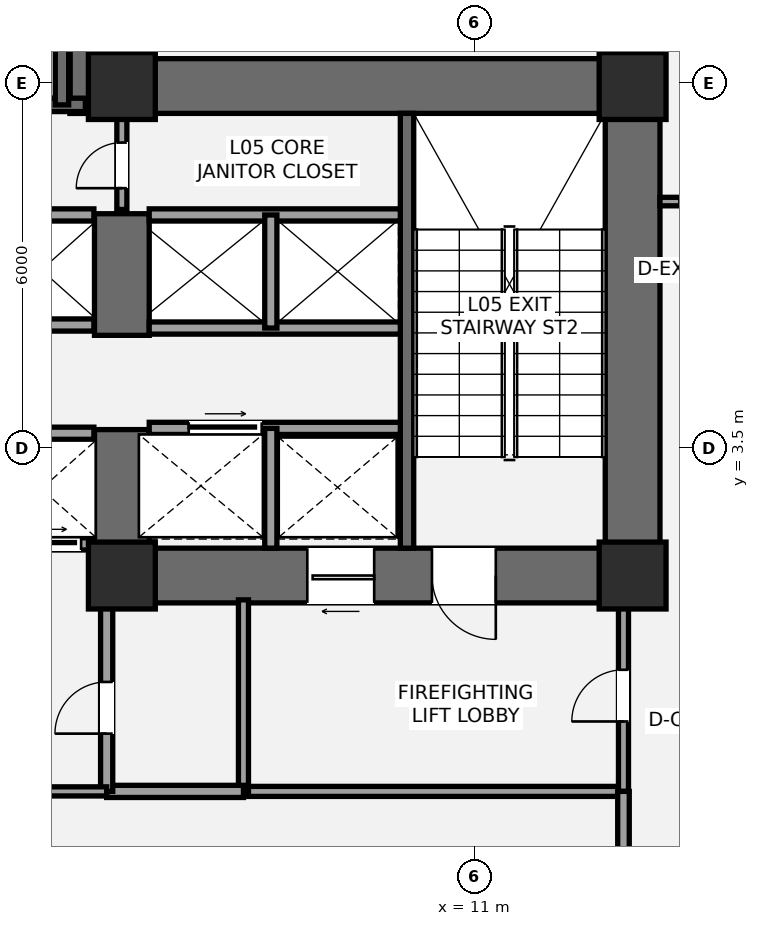
"""IFC4 building model, lengths in metres.
Left out: names, types, materials, properties, quantities, classifications, styles, units other than length and angle.
Written with IfcOpenShell. Run it as: python <this file> out.ifc"""

import sys

from ifc_helpers import new_model, si_unit, direction, frame, frame_2d, origin, origin_2d, place, context, subcontext, project, spatial, rectangle, extrude, element, fill, save


model = new_model("IFC4")
c1 = context("Model", 3, precision=1e-05, world=origin(), true_north=direction((0.0, 1.0)))
c2 = subcontext(c1, "Body", "Model", "MODEL_VIEW")
j1 = project(units=[si_unit("LENGTHUNIT", "METRE"), si_unit("PLANEANGLEUNIT", "RADIAN")], contexts=[c1])
p1 = place(None, origin())
s1 = spatial("IfcSite", under=j1, at=p1, CompositionType="ELEMENT")
p2 = place(p1, origin())
s2 = spatial("IfcBuilding", under=s1, at=p2, CompositionType="ELEMENT")
p3 = place(p2, frame((0.0, 0.0, 22.8)))
s3 = spatial("IfcBuildingStorey", under=s2, at=p3, CompositionType="ELEMENT", Elevation=22.8)
p4 = place(p3, frame((13.6, 0.95, 0.0), z_axis=(0.0, 0.0, 1.0), x_axis=(0.0, 1.0, 0.0)))
e1 = element("IfcWall", 1, at=p4, inside=s3, PredefinedType="SHEAR", context=c2, shape_type="SweptSolid", body=[
    extrude(rectangle(XDim=8.95, YDim=0.9, at=frame_2d((4.475, 0.0))), origin(), (0.0, 0.0, 1.0), 4.2),
])
p5 = place(p3, frame((4.35, 9.45, 0.0), z_axis=(0.0, 0.0, 1.0), x_axis=(1.0, 0.0, 0.0)))
e2 = element("IfcWall", 2, at=p5, inside=s3, PredefinedType="SHEAR", context=c2, shape_type="SweptSolid", body=[
    extrude(rectangle(XDim=9.7, YDim=0.9, at=frame_2d((4.85, 0.0))), origin(), (0.0, 0.0, 1.0), 4.2),
])
p6 = place(p3, frame((14.05, 1.4, 0.0), z_axis=(0.0, 0.0, 1.0), x_axis=(-1.0, 0.0, 0.0)))
e3 = element("IfcWall", 3, at=p6, inside=s3, PredefinedType="SHEAR", context=c2, shape_type="SweptSolid", body=[
    extrude(rectangle(XDim=9.3, YDim=0.9, at=frame_2d((4.65, 0.0))), origin(), (0.0, 0.0, 1.0), 4.2),
])
p7 = place(p6, frame((2.7, 0.0, 0.0)))
e4 = element("IfcOpeningElement", 4, at=p7, cuts=e3, PredefinedType="OPENING", context=c2, shape_type="SweptSolid", body=[
    extrude(rectangle(XDim=1.05, YDim=2.15, at=frame_2d((0.525, 1.075))), frame((0.0, 0.46, 0.0), z_axis=(0.0, -1.0, 0.0), x_axis=(1.0, 0.0, 0.0)), (0.0, 0.0, 1.0), 0.92),
])
p8 = place(p6, frame((4.7, 0.0, 0.0)))
e5 = element("IfcOpeningElement", 5, at=p8, cuts=e3, PredefinedType="OPENING", context=c2, shape_type="SweptSolid", body=[
    extrude(rectangle(XDim=1.1, YDim=2.2, at=frame_2d((0.55, 1.1))), frame((0.0, 0.46, 0.0), z_axis=(0.0, -1.0, 0.0), x_axis=(1.0, 0.0, 0.0)), (0.0, 0.0, 1.0), 0.92),
])
p9 = place(p3, frame((5.2, 0.95, 0.0), z_axis=(0.0, 0.0, 1.0), x_axis=(0.0, 1.0, 0.0)))
e6 = element("IfcWall", 6, at=p9, inside=s3, PredefinedType="SHEAR", context=c2, shape_type="SweptSolid", body=[
    extrude(rectangle(XDim=2.85, YDim=0.9, at=frame_2d((1.425, 0.0))), origin(), (0.0, 0.0, 1.0), 4.2),
])
p10 = place(p3, frame((5.2, 5.35, 0.0), z_axis=(0.0, 0.0, 1.0), x_axis=(0.0, 1.0, 0.0)))
e7 = element("IfcWall", 7, at=p10, inside=s3, PredefinedType="SHEAR", context=c2, shape_type="SweptSolid", body=[
    extrude(rectangle(XDim=2.0, YDim=0.9, at=frame_2d((1.0, 0.0))), origin(), (0.0, 0.0, 1.0), 4.2),
])
p11 = place(p3, frame((9.89, 1.85, 0.0), z_axis=(0.0, 0.0, 1.0), x_axis=(0.0, 1.0, 0.0)))
e8 = element("IfcWall", 8, at=p11, inside=s3, PredefinedType="SHEAR", context=c2, shape_type="SweptSolid", body=[
    extrude(rectangle(XDim=7.15, YDim=0.22, at=frame_2d((3.575, 0.0))), origin(), (0.0, 0.0, 1.0), 4.2),
])
p12 = place(p3, frame((4.8, 9.0, 0.0), z_axis=(0.0, 0.0, 1.0), x_axis=(0.0, 1.0, 0.0)))
e9 = element("IfcWall", 9, at=p12, inside=s3, PredefinedType="SHEAR", context=c2, shape_type="SweptSolid", body=[
    extrude(rectangle(XDim=4.3, YDim=0.9, at=frame_2d((2.15, 0.0))), origin(), (0.0, 0.0, 1.0), 4.2),
])
p13 = place(p3, frame((-4.7, 9.14, 0.0), z_axis=(0.0, 0.0, 1.0), x_axis=(1.0, 0.0, 0.0)))
e10 = element("IfcWall", 10, at=p13, inside=s3, PredefinedType="SHEAR", context=c2, shape_type="SweptSolid", body=[
    extrude(rectangle(XDim=9.3, YDim=0.22, at=frame_2d((4.65, 0.0))), origin(), (0.0, 0.0, 1.0), 4.2),
])
p14 = place(p13, frame((1.15, 0.0, 0.0)))
e11 = element("IfcOpeningElement", 11, at=p14, cuts=e10, PredefinedType="OPENING", context=c2, shape_type="SweptSolid", body=[
    extrude(rectangle(XDim=1.05, YDim=2.15, at=frame_2d((0.525, 1.075))), frame((0.0, 0.12, 0.0), z_axis=(0.0, -1.0, 0.0), x_axis=(1.0, 0.0, 0.0)), (0.0, 0.0, 1.0), 0.24),
])
p15 = place(p3, frame((4.215, 9.14, 0.0), z_axis=(0.0, 0.0, 1.0), x_axis=(0.0, 1.0, 0.0)))
e12 = element("IfcWall", 12, at=p15, inside=s3, PredefinedType="SHEAR", context=c2, shape_type="SweptSolid", body=[
    extrude(rectangle(XDim=3.26, YDim=0.22, at=frame_2d((1.63, 0.0))), origin(), (0.0, 0.0, 1.0), 4.2),
])
for number, where, z_axis, x_axis in (
    (13, (5.2, 1.4, 0.0), (0.0, 0.0, 1.0), (1.0, 0.0, 0.0)),
    (14, (5.2, 9.45, 0.0), (0.0, 0.0, 1.0), (1.0, 0.0, 0.0)),
    (15, (13.6, 1.4, 0.0), (0.0, 0.0, 1.0), (1.0, 0.0, 0.0)),
    (16, (13.6, 9.45, 0.0), (0.0, 0.0, 1.0), (1.0, 0.0, 0.0)),
):
    element("IfcColumn", number, at=place(p3, frame(where, z_axis=z_axis, x_axis=x_axis)), inside=s3, PredefinedType="COLUMN", context=c2, shape_type="SweptSolid", body=[
        extrude(rectangle(XDim=1.1, YDim=1.1, at=origin_2d()), origin(), (0.0, 0.0, 1.0), 4.2),
    ])
p16 = place(p3, frame((7.2, -2.15, 0.0), z_axis=(0.0, 0.0, 1.0), x_axis=(1.0, 0.0, 0.0)))
e17 = element("IfcWall", 17, at=p16, inside=s3, PredefinedType="PARTITIONING", context=c2, shape_type="SweptSolid", body=[
    extrude(rectangle(XDim=6.25, YDim=0.165, at=frame_2d((3.125, 0.0))), origin(), (0.0, 0.0, 1.0), 3.9),
])
p17 = place(p3, frame((7.2, -2.15, 0.0), z_axis=(0.0, 0.0, 1.0), x_axis=(0.0, 1.0, 0.0)))
e18 = element("IfcWall", 18, at=p17, inside=s3, PredefinedType="PARTITIONING", context=c2, shape_type="SweptSolid", body=[
    extrude(rectangle(XDim=3.15, YDim=0.165, at=frame_2d((1.575, 0.0))), origin(), (0.0, 0.0, 1.0), 3.9),
])
p18 = place(p3, frame((13.45, -2.15, 0.0), z_axis=(0.0, 0.0, 1.0), x_axis=(0.0, 1.0, 0.0)))
e19 = element("IfcWall", 19, at=p18, inside=s3, PredefinedType="PARTITIONING", context=c2, shape_type="SweptSolid", body=[
    extrude(rectangle(XDim=3.15, YDim=0.165, at=frame_2d((1.575, 0.0))), origin(), (0.0, 0.0, 1.0), 2.09),
])
p19 = place(p18, frame((1.15, 0.0, 0.0)))
e20 = element("IfcOpeningElement", 20, at=p19, cuts=e19, PredefinedType="OPENING", context=c2, shape_type="SweptSolid", body=[
    extrude(rectangle(XDim=0.85, YDim=2.0, at=frame_2d((0.425, 1.0))), frame((0.0, 0.093, 0.0), z_axis=(0.0, -1.0, 0.0), x_axis=(1.0, 0.0, 0.0)), (0.0, 0.0, 1.0), 0.185),
])
p20 = place(p3, frame((4.95, -2.15, 0.0), z_axis=(0.0, 0.0, 1.0), x_axis=(1.0, 0.0, 0.0)))
e21 = element("IfcWall", 21, at=p20, inside=s3, PredefinedType="SOLIDWALL", context=c2, shape_type="SweptSolid", body=[
    extrude(rectangle(XDim=2.25, YDim=0.2, at=frame_2d((1.125, 0.0))), origin(), (0.0, 0.0, 1.0), 2.09),
])
p21 = place(p3, frame((4.95, -2.15, 0.0), z_axis=(0.0, 0.0, 1.0), x_axis=(0.0, 1.0, 0.0)))
e22 = element("IfcWall", 22, at=p21, inside=s3, PredefinedType="SOLIDWALL", context=c2, shape_type="SweptSolid", body=[
    extrude(rectangle(XDim=3.15, YDim=0.2, at=frame_2d((1.575, 0.0))), origin(), (0.0, 0.0, 1.0), 2.09),
])
p22 = place(p21, frame((0.95, 0.0, 0.0)))
e23 = element("IfcOpeningElement", 23, at=p22, cuts=e22, PredefinedType="OPENING", context=c2, shape_type="SweptSolid", body=[
    extrude(rectangle(XDim=0.85, YDim=2.0, at=frame_2d((0.425, 1.0))), frame((0.0, 0.11, 0.0), z_axis=(0.0, -1.0, 0.0), x_axis=(1.0, 0.0, 0.0)), (0.0, 0.0, 1.0), 0.22),
])
p23 = place(p3, frame((5.65, 3.82, 0.0), z_axis=(0.0, 0.0, 1.0), x_axis=(1.0, 0.0, 0.0)))
e24 = element("IfcWall", 24, at=p23, inside=s3, PredefinedType="SOLIDWALL", context=c2, shape_type="SweptSolid", body=[
    extrude(rectangle(XDim=4.13, YDim=0.2, at=frame_2d((2.065, 0.0))), origin(), (0.0, 0.0, 1.0), 3.9),
])
p24 = place(p23, frame((0.65, 0.0, 0.0)))
e25 = element("IfcOpeningElement", 25, at=p24, cuts=e24, PredefinedType="OPENING", context=c2, shape_type="SweptSolid", body=[
    extrude(rectangle(XDim=1.2, YDim=2.2, at=frame_2d((0.6, 1.1))), frame((0.0, 0.11, 0.0), z_axis=(0.0, -1.0, 0.0), x_axis=(1.0, 0.0, 0.0)), (0.0, 0.0, 1.0), 0.22),
])
p25 = place(p3, frame((7.65, 1.85, 0.0), z_axis=(0.0, 0.0, 1.0), x_axis=(0.0, 1.0, 0.0)))
e26 = element("IfcWall", 26, at=p25, inside=s3, PredefinedType="SOLIDWALL", context=c2, shape_type="SweptSolid", body=[
    extrude(rectangle(XDim=1.97, YDim=0.2, at=frame_2d((0.985, 0.0))), origin(), (0.0, 0.0, 1.0), 3.9),
])
for number, where, z_axis, x_axis in (
    (27, (5.65, 5.47, 0.0), (0.0, 0.0, 1.0), (1.0, 0.0, 0.0)),
    (28, (5.65, 7.33, 0.0), (0.0, 0.0, 1.0), (1.0, 0.0, 0.0)),
):
    element("IfcWall", number, at=place(p3, frame(where, z_axis=z_axis, x_axis=x_axis)), inside=s3, PredefinedType="SOLIDWALL", context=c2, shape_type="SweptSolid", body=[
        extrude(rectangle(XDim=4.13, YDim=0.2, at=frame_2d((2.065, 0.0))), origin(), (0.0, 0.0, 1.0), 3.9),
    ])
p26 = place(p3, frame((7.65, 5.47, 0.0), z_axis=(0.0, 0.0, 1.0), x_axis=(0.0, 1.0, 0.0)))
e29 = element("IfcWall", 29, at=p26, inside=s3, PredefinedType="SOLIDWALL", context=c2, shape_type="SweptSolid", body=[
    extrude(rectangle(XDim=1.86, YDim=0.2, at=frame_2d((0.93, 0.0))), origin(), (0.0, 0.0, 1.0), 3.9),
])
p27 = place(p3, frame((0.88, 1.92, 0.0), z_axis=(0.0, 0.0, 1.0), x_axis=(1.0, 0.0, 0.0)))
e30 = element("IfcWall", 30, at=p27, inside=s3, PredefinedType="SOLIDWALL", context=c2, shape_type="SweptSolid", body=[
    extrude(rectangle(XDim=3.86, YDim=0.2, at=frame_2d((1.93, 0.0))), origin(), (0.0, 0.0, 1.0), 2.89),
])
p28 = place(p27, frame((0.55, 0.0, 0.0)))
e31 = element("IfcOpeningElement", 31, at=p28, cuts=e30, PredefinedType="OPENING", context=c2, shape_type="SweptSolid", body=[
    extrude(rectangle(XDim=1.1, YDim=2.2, at=frame_2d((0.55, 1.1))), frame((0.0, 0.11, 0.0), z_axis=(0.0, -1.0, 0.0), x_axis=(1.0, 0.0, 0.0)), (0.0, 0.0, 1.0), 0.22),
])
p29 = place(p27, frame((2.55, 0.0, 0.0)))
e32 = element("IfcOpeningElement", 32, at=p29, cuts=e30, PredefinedType="OPENING", context=c2, shape_type="SweptSolid", body=[
    extrude(rectangle(XDim=1.1, YDim=2.2, at=frame_2d((0.55, 1.1))), frame((0.0, 0.11, 0.0), z_axis=(0.0, -1.0, 0.0), x_axis=(1.0, 0.0, 0.0)), (0.0, 0.0, 1.0), 0.22),
])
for number, where, z_axis, x_axis in (
    (33, (0.88, 3.74, 0.0), (0.0, 0.0, 1.0), (1.0, 0.0, 0.0)),
    (34, (0.88, 5.52, 0.0), (0.0, 0.0, 1.0), (1.0, 0.0, 0.0)),
    (35, (0.88, 7.33, 0.0), (0.0, 0.0, 1.0), (1.0, 0.0, 0.0)),
):
    element("IfcWall", number, at=place(p3, frame(where, z_axis=z_axis, x_axis=x_axis)), inside=s3, PredefinedType="SOLIDWALL", context=c2, shape_type="SweptSolid", body=[
        extrude(rectangle(XDim=3.86, YDim=0.2, at=frame_2d((1.93, 0.0))), origin(), (0.0, 0.0, 1.0), 3.9),
    ])
p30 = place(p3, frame((5.2, 7.42, 0.0), z_axis=(0.0, 0.0, 1.0), x_axis=(0.0, 1.0, 0.0)))
e36 = element("IfcWall", 36, at=p30, inside=s3, PredefinedType="PARTITIONING", context=c2, shape_type="SweptSolid", body=[
    extrude(rectangle(XDim=1.58, YDim=0.165, at=frame_2d((0.79, 0.0))), origin(), (0.0, 0.0, 1.0), 3.9),
])
p31 = place(p30, frame((0.35, 0.0, 0.0)))
e37 = element("IfcOpeningElement", 37, at=p31, cuts=e36, PredefinedType="OPENING", context=c2, shape_type="SweptSolid", body=[
    extrude(rectangle(XDim=0.75, YDim=2.1, at=frame_2d((0.375, 1.05))), frame((0.0, 0.093, 0.0), z_axis=(0.0, -1.0, 0.0), x_axis=(1.0, 0.0, 0.0)), (0.0, 0.0, 1.0), 0.185),
])
p32 = place(p3, frame((2.1, -2.15, 0.0), z_axis=(0.0, 0.0, 1.0), x_axis=(1.0, 0.0, 0.0)))
e38 = element("IfcWall", 38, at=p32, inside=s3, PredefinedType="PLUMBINGWALL", context=c2, shape_type="SweptSolid", body=[
    extrude(rectangle(XDim=2.85, YDim=0.15, at=frame_2d((1.425, 0.0))), origin(), (0.0, 0.0, 1.0), 3.9),
])
p33 = place(p3, frame((13.45, -4.05, 0.0), z_axis=(0.0, 0.0, 1.0), x_axis=(0.0, 1.0, 0.0)))
e39 = element("IfcWall", 39, at=p33, inside=s3, PredefinedType="PLUMBINGWALL", context=c2, shape_type="SweptSolid", body=[
    extrude(rectangle(XDim=1.9, YDim=0.19, at=frame_2d((0.95, 0.0))), origin(), (0.0, 0.0, 1.0), 3.353),
])
p34 = place(p3, frame((14.05, 7.55, 0.0), z_axis=(0.0, 0.0, 1.0), x_axis=(1.0, 0.0, 0.0)))
e40 = element("IfcWall", 40, at=p34, inside=s3, PredefinedType="PARTITIONING", context=c2, shape_type="SweptSolid", body=[
    extrude(rectangle(XDim=4.35, YDim=0.14, at=frame_2d((2.175, 0.0))), origin(), (0.0, 0.0, 1.0), 3.9),
])
p35 = place(p34, frame((0.32, 0.0, 0.0)))
e41 = element("IfcOpeningElement", 41, at=p35, cuts=e40, PredefinedType="OPENING", context=c2, shape_type="SweptSolid", body=[
    extrude(rectangle(XDim=0.92, YDim=2.15, at=frame_2d((0.46, 1.075))), frame((0.0, 0.08, 0.0), z_axis=(0.0, -1.0, 0.0), x_axis=(1.0, 0.0, 0.0)), (0.0, 0.0, 1.0), 0.16),
])
p36 = place(p7, origin())
e42 = element("IfcDoor", 42, at=p36, inside=s3, OperationType="SINGLE_SWING_LEFT", PredefinedType="DOOR", context=c2, shape_type="SweptSolid", body=[
    extrude(rectangle(XDim=1.05, YDim=2.15, at=frame_2d((0.525, 1.075))), frame((0.0, 0.025, 0.0), z_axis=(0.0, -1.0, 0.0), x_axis=(1.0, 0.0, 0.0)), (0.0, 0.0, 1.0), 0.05),
])
fill(e4, e42)
p37 = place(p19, origin())
e43 = element("IfcDoor", 43, at=p37, inside=s3, OperationType="SINGLE_SWING_LEFT", PredefinedType="DOOR", context=c2, shape_type="SweptSolid", body=[
    extrude(rectangle(XDim=0.85, YDim=2.0, at=frame_2d((0.425, 1.0))), frame((0.0, 0.025, 0.0), z_axis=(0.0, -1.0, 0.0), x_axis=(1.0, 0.0, 0.0)), (0.0, 0.0, 1.0), 0.05),
])
fill(e20, e43)
p38 = place(p22, origin())
e44 = element("IfcDoor", 44, at=p38, inside=s3, OperationType="SINGLE_SWING_LEFT", PredefinedType="DOOR", context=c2, shape_type="SweptSolid", body=[
    extrude(rectangle(XDim=0.85, YDim=2.0, at=frame_2d((0.425, 1.0))), frame((0.0, 0.025, 0.0), z_axis=(0.0, -1.0, 0.0), x_axis=(1.0, 0.0, 0.0)), (0.0, 0.0, 1.0), 0.05),
])
fill(e23, e44)
p39 = place(p8, origin())
e45 = element("IfcDoor", 45, at=p39, inside=s3, OperationType="SLIDING_TO_LEFT", PredefinedType="DOOR", context=c2, shape_type="SweptSolid", body=[
    extrude(rectangle(XDim=1.1, YDim=2.2, at=frame_2d((0.55, 1.1))), frame((0.0, 0.025, 0.0), z_axis=(0.0, -1.0, 0.0), x_axis=(1.0, 0.0, 0.0)), (0.0, 0.0, 1.0), 0.05),
])
fill(e5, e45)
p40 = place(p24, origin())
e46 = element("IfcDoor", 46, at=p40, inside=s3, OperationType="SLIDING_TO_RIGHT", PredefinedType="DOOR", context=c2, shape_type="SweptSolid", body=[
    extrude(rectangle(XDim=1.2, YDim=2.2, at=frame_2d((0.6, 1.1))), frame((0.0, 0.025, 0.0), z_axis=(0.0, -1.0, 0.0), x_axis=(1.0, 0.0, 0.0)), (0.0, 0.0, 1.0), 0.05),
])
fill(e25, e46)
p41 = place(p29, origin())
e47 = element("IfcDoor", 47, at=p41, inside=s3, OperationType="SLIDING_TO_LEFT", PredefinedType="DOOR", context=c2, shape_type="SweptSolid", body=[
    extrude(rectangle(XDim=1.1, YDim=2.2, at=frame_2d((0.55, 1.1))), frame((0.0, 0.025, 0.0), z_axis=(0.0, -1.0, 0.0), x_axis=(1.0, 0.0, 0.0)), (0.0, 0.0, 1.0), 0.05),
])
fill(e32, e47)
p42 = place(p31, origin())
e48 = element("IfcDoor", 48, at=p42, inside=s3, OperationType="SINGLE_SWING_LEFT", PredefinedType="DOOR", context=c2, shape_type="SweptSolid", body=[
    extrude(rectangle(XDim=0.75, YDim=2.1, at=frame_2d((0.375, 1.05))), frame((0.0, 0.025, 0.0), z_axis=(0.0, -1.0, 0.0), x_axis=(1.0, 0.0, 0.0)), (0.0, 0.0, 1.0), 0.05),
])
fill(e37, e48)
save(model, sys.argv[1])
